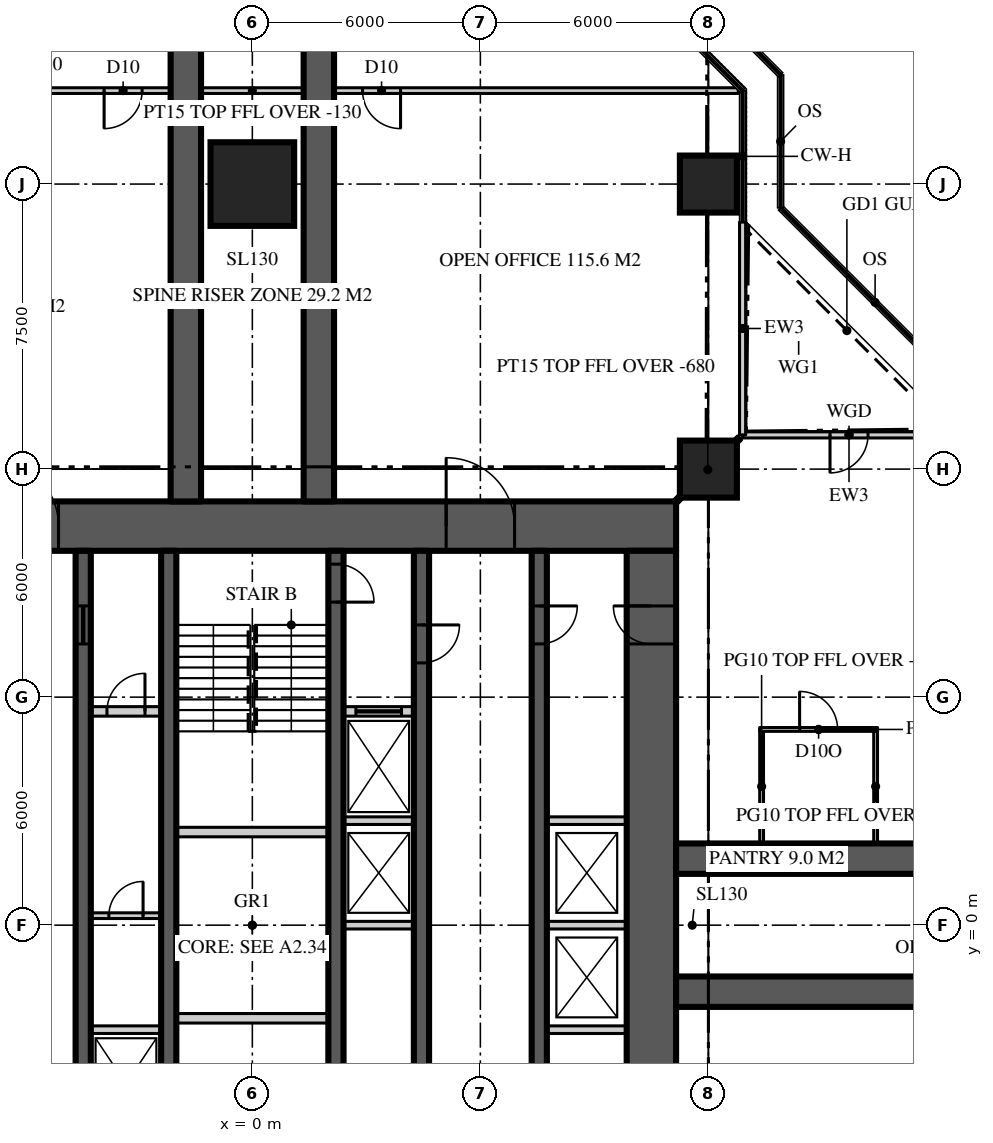
"""IFC4 building model, lengths in metres.
Left out: names, types, materials, properties, quantities, classifications, styles, units other than length and angle.
Written with IfcOpenShell. Run it as: python <this file> out.ifc"""

import sys

from ifc_helpers import new_model, si_unit, direction, frame, frame_2d, origin, origin_2d, place, context, subcontext, project, spatial, rectangle, extrude, element, fill, save


model = new_model("IFC4")
c1 = context("Model", 3, precision=1e-05, world=origin(), true_north=direction((0.0, 1.0)))
c2 = subcontext(c1, "Body", "Model", "MODEL_VIEW")
j1 = project(units=[si_unit("LENGTHUNIT", "METRE"), si_unit("PLANEANGLEUNIT", "RADIAN")], contexts=[c1])
p1 = place(None, origin())
s1 = spatial("IfcSite", under=j1, at=p1, CompositionType="ELEMENT")
p2 = place(p1, origin())
s2 = spatial("IfcBuilding", under=s1, at=p2, CompositionType="ELEMENT")
p3 = place(p2, frame((0.0, 0.0, 259.5)))
s3 = spatial("IfcBuildingStorey", under=s2, at=p3, CompositionType="ELEMENT", Elevation=259.5)
p4 = place(p3, frame((-11.15, 10.5, 0.0), z_axis=(0.0, 0.0, 1.0), x_axis=(1.0, 0.0, 0.0)))
e1 = element("IfcWall", 1, at=p4, inside=s3, PredefinedType="SHEAR", context=c2, shape_type="SweptSolid", body=[
    extrude(rectangle(XDim=22.3, YDim=1.3, at=frame_2d((11.15, 0.0))), origin(), (0.0, 0.0, 1.0), 3.9),
])
p5 = place(p4, frame((4.25, 0.0, 0.0)))
e2 = element("IfcOpeningElement", 2, at=p5, cuts=e1, PredefinedType="OPENING", context=c2, shape_type="SweptSolid", body=[
    extrude(rectangle(XDim=1.8, YDim=2.2, at=frame_2d((0.9, 1.1))), frame((0.0, 0.66, 0.0), z_axis=(0.0, -1.0, 0.0), x_axis=(1.0, 0.0, 0.0)), (0.0, 0.0, 1.0), 1.32),
])
p6 = place(p4, frame((16.25, 0.0, 0.0)))
e3 = element("IfcOpeningElement", 3, at=p6, cuts=e1, PredefinedType="OPENING", context=c2, shape_type="SweptSolid", body=[
    extrude(rectangle(XDim=1.8, YDim=2.2, at=frame_2d((0.9, 1.1))), frame((0.0, 0.66, 0.0), z_axis=(0.0, -1.0, 0.0), x_axis=(1.0, 0.0, 0.0)), (0.0, 0.0, 1.0), 1.32),
])
p7 = place(p3, frame((10.5, -9.85, 0.0), z_axis=(0.0, 0.0, 1.0), x_axis=(0.0, 1.0, 0.0)))
e4 = element("IfcWall", 4, at=p7, inside=s3, PredefinedType="SHEAR", context=c2, shape_type="SweptSolid", body=[
    extrude(rectangle(XDim=19.7, YDim=1.3, at=frame_2d((9.85, 0.0))), origin(), (0.0, 0.0, 1.0), 3.9),
])
p8 = place(p7, frame((17.25, 0.0, 0.0)))
e5 = element("IfcOpeningElement", 5, at=p8, cuts=e4, PredefinedType="OPENING", context=c2, shape_type="SweptSolid", body=[
    extrude(rectangle(XDim=1.0, YDim=2.2, at=frame_2d((0.5, 1.1))), frame((0.0, 0.66, 0.0), z_axis=(0.0, -1.0, 0.0), x_axis=(1.0, 0.0, 0.0)), (0.0, 0.0, 1.0), 1.32),
])
for number, where, z_axis, x_axis in (
    (6, (11.15, -1.75, 0.0), (0.0, 0.0, 1.0), (1.0, 0.0, 0.0)),
    (7, (11.15, 1.75, 0.0), (0.0, 0.0, 1.0), (1.0, 0.0, 0.0)),
    (8, (1.75, 11.15, 0.0), (0.0, 0.0, 1.0), (0.0, 1.0, 0.0)),
    (9, (-1.75, 11.15, 0.0), (0.0, 0.0, 1.0), (0.0, 1.0, 0.0)),
):
    element("IfcWall", number, at=place(p3, frame(where, z_axis=z_axis, x_axis=x_axis)), inside=s3, PredefinedType="SHEAR", context=c2, shape_type="SweptSolid", body=[
        extrude(rectangle(XDim=15.25, YDim=0.8, at=frame_2d((7.625, 0.0))), origin(), (0.0, 0.0, 1.0), 3.9),
    ])
p9 = place(p3, frame((12.0, 12.0, 0.0), z_axis=(0.0, 0.0, 1.0), x_axis=(1.0, 0.0, 0.0)))
e10 = element("IfcColumn", 10, at=p9, inside=s3, PredefinedType="COLUMN", context=c2, shape_type="SweptSolid", body=[
    extrude(rectangle(XDim=1.5, YDim=1.5, at=origin_2d()), origin(), (0.0, 0.0, 1.0), 3.9),
])
p10 = place(p3, frame((0.0, 19.5, 0.0), z_axis=(0.0, 0.0, 1.0), x_axis=(1.0, 0.0, 0.0)))
e11 = element("IfcColumn", 11, at=p10, inside=s3, PredefinedType="COLUMN", context=c2, shape_type="SweptSolid", body=[
    extrude(rectangle(XDim=2.2, YDim=2.2, at=origin_2d()), origin(), (0.0, 0.0, 1.0), 3.9),
])
p11 = place(p3, frame((12.0, 19.5, 0.0), z_axis=(0.0, 0.0, 1.0), x_axis=(1.0, 0.0, 0.0)))
e12 = element("IfcColumn", 12, at=p11, inside=s3, PredefinedType="COLUMN", context=c2, shape_type="SweptSolid", body=[
    extrude(rectangle(XDim=1.5, YDim=1.5, at=origin_2d()), origin(), (0.0, 0.0, 1.0), 3.9),
])
p12 = place(p3, frame((18.5, 12.9, 0.0), z_axis=(0.0, 0.0, 1.0), x_axis=(-1.0, 0.0, 0.0)))
e13 = element("IfcWall", 13, at=p12, inside=s3, PredefinedType="SOLIDWALL", context=c2, shape_type="SweptSolid", body=[
    extrude(rectangle(XDim=5.6, YDim=0.16, at=frame_2d((2.8, 0.0))), origin(), (0.0, 0.0, 1.0), 3.77),
])
p13 = place(p12, frame((2.3, 0.0, 0.0)))
e14 = element("IfcOpeningElement", 14, at=p13, cuts=e13, PredefinedType="OPENING", context=c2, shape_type="SweptSolid", body=[
    extrude(rectangle(XDim=1.0, YDim=2.2, at=frame_2d((0.5, 1.1))), frame((0.0, 0.09, 0.0), z_axis=(0.0, -1.0, 0.0), x_axis=(1.0, 0.0, 0.0)), (0.0, 0.0, 1.0), 0.18),
])
p14 = place(p3, frame((12.9, 12.9, 0.0), z_axis=(0.0, 0.0, 1.0), x_axis=(0.0, 1.0, 0.0)))
e15 = element("IfcWall", 15, at=p14, inside=s3, PredefinedType="SOLIDWALL", context=c2, shape_type="SweptSolid", body=[
    extrude(rectangle(XDim=5.6, YDim=0.16, at=frame_2d((2.8, 0.0))), origin(), (0.0, 0.0, 1.0), 3.77),
])
p15 = place(p3, frame((7.55, 9.85, 0.0), z_axis=(0.0, 0.0, 1.0), x_axis=(0.0, -1.0, 0.0)))
e16 = element("IfcWall", 16, at=p15, inside=s3, PredefinedType="SHEAR", context=c2, shape_type="SweptSolid", body=[
    extrude(rectangle(XDim=19.7, YDim=0.4, at=frame_2d((9.85, 0.0))), origin(), (0.0, 0.0, 1.0), 3.9),
])
p16 = place(p15, frame((1.45, 0.0, 0.0)))
e17 = element("IfcOpeningElement", 17, at=p16, cuts=e16, PredefinedType="OPENING", context=c2, shape_type="SweptSolid", body=[
    extrude(rectangle(XDim=1.0, YDim=2.2, at=frame_2d((0.5, 1.1))), frame((0.0, 0.21, 0.0), z_axis=(0.0, -1.0, 0.0), x_axis=(1.0, 0.0, 0.0)), (0.0, 0.0, 1.0), 0.42),
])
p17 = place(p15, frame((17.3, 0.0, 0.0)))
e18 = element("IfcOpeningElement", 18, at=p17, cuts=e16, PredefinedType="OPENING", context=c2, shape_type="SweptSolid", body=[
    extrude(rectangle(XDim=0.9, YDim=2.1, at=frame_2d((0.45, 1.05))), frame((0.0, 0.21, 0.0), z_axis=(0.0, -1.0, 0.0), x_axis=(1.0, 0.0, 0.0)), (0.0, 0.0, 1.0), 0.42),
])
p18 = place(p3, frame((-4.45, -9.85, 0.0), z_axis=(0.0, 0.0, 1.0), x_axis=(0.0, 1.0, 0.0)))
e19 = element("IfcWall", 19, at=p18, inside=s3, PredefinedType="SHEAR", context=c2, shape_type="SweptSolid", body=[
    extrude(rectangle(XDim=19.7, YDim=0.4, at=frame_2d((9.85, 0.0))), origin(), (0.0, 0.0, 1.0), 3.9),
])
p19 = place(p18, frame((1.95, 0.0, 0.0)))
e20 = element("IfcOpeningElement", 20, at=p19, cuts=e19, PredefinedType="OPENING", context=c2, shape_type="SweptSolid", body=[
    extrude(rectangle(XDim=1.0, YDim=2.2, at=frame_2d((0.5, 1.1))), frame((0.0, 0.21, 0.0), z_axis=(0.0, -1.0, 0.0), x_axis=(1.0, 0.0, 0.0)), (0.0, 0.0, 1.0), 0.42),
])
p20 = place(p18, frame((17.25, 0.0, 0.0)))
e21 = element("IfcOpeningElement", 21, at=p20, cuts=e19, PredefinedType="OPENING", context=c2, shape_type="SweptSolid", body=[
    extrude(rectangle(XDim=1.0, YDim=2.1, at=frame_2d((0.5, 1.05))), frame((0.0, 0.21, 0.0), z_axis=(0.0, -1.0, 0.0), x_axis=(1.0, 0.0, 0.0)), (0.0, 0.0, 1.0), 0.42),
])
p21 = place(p3, frame((4.45, 9.85, 0.0), z_axis=(0.0, 0.0, 1.0), x_axis=(0.0, -1.0, 0.0)))
e22 = element("IfcWall", 22, at=p21, inside=s3, PredefinedType="SHEAR", context=c2, shape_type="SweptSolid", body=[
    extrude(rectangle(XDim=19.7, YDim=0.4, at=frame_2d((9.85, 0.0))), origin(), (0.0, 0.0, 1.0), 3.9),
])
p22 = place(p21, frame((1.95, 0.0, 0.0)))
e23 = element("IfcOpeningElement", 23, at=p22, cuts=e22, PredefinedType="OPENING", context=c2, shape_type="SweptSolid", body=[
    extrude(rectangle(XDim=1.0, YDim=2.2, at=frame_2d((0.5, 1.1))), frame((0.0, 0.21, 0.0), z_axis=(0.0, -1.0, 0.0), x_axis=(1.0, 0.0, 0.0)), (0.0, 0.0, 1.0), 0.42),
])
p23 = place(p21, frame((17.3, 0.0, 0.0)))
e24 = element("IfcOpeningElement", 24, at=p23, cuts=e22, PredefinedType="OPENING", context=c2, shape_type="SweptSolid", body=[
    extrude(rectangle(XDim=0.9, YDim=2.1, at=frame_2d((0.45, 1.05))), frame((0.0, 0.21, 0.0), z_axis=(0.0, -1.0, 0.0), x_axis=(1.0, 0.0, 0.0)), (0.0, 0.0, 1.0), 0.42),
])
p24 = place(p3, frame((-2.2, -9.85, 0.0), z_axis=(0.0, 0.0, 1.0), x_axis=(0.0, 1.0, 0.0)))
e25 = element("IfcWall", 25, at=p24, inside=s3, PredefinedType="SHEAR", context=c2, shape_type="SweptSolid", body=[
    extrude(rectangle(XDim=19.7, YDim=0.4, at=frame_2d((9.85, 0.0))), origin(), (0.0, 0.0, 1.0), 3.9),
])
p25 = place(p24, frame((0.35, 0.0, 0.0)))
e26 = element("IfcOpeningElement", 26, at=p25, cuts=e25, PredefinedType="OPENING", context=c2, shape_type="SweptSolid", body=[
    extrude(rectangle(XDim=1.0, YDim=2.2, at=frame_2d((0.5, 1.1))), frame((0.0, 0.21, 0.0), z_axis=(0.0, -1.0, 0.0), x_axis=(1.0, 0.0, 0.0)), (0.0, 0.0, 1.0), 0.42),
])
p26 = place(p3, frame((2.2, 9.85, 0.0), z_axis=(0.0, 0.0, 1.0), x_axis=(0.0, -1.0, 0.0)))
e27 = element("IfcWall", 27, at=p26, inside=s3, PredefinedType="SHEAR", context=c2, shape_type="SweptSolid", body=[
    extrude(rectangle(XDim=19.7, YDim=0.4, at=frame_2d((9.85, 0.0))), origin(), (0.0, 0.0, 1.0), 3.9),
])
p27 = place(p26, frame((0.35, 0.0, 0.0)))
e28 = element("IfcOpeningElement", 28, at=p27, cuts=e27, PredefinedType="OPENING", context=c2, shape_type="SweptSolid", body=[
    extrude(rectangle(XDim=1.0, YDim=2.2, at=frame_2d((0.5, 1.1))), frame((0.0, 0.21, 0.0), z_axis=(0.0, -1.0, 0.0), x_axis=(1.0, 0.0, 0.0)), (0.0, 0.0, 1.0), 0.42),
])
p28 = place(p3, frame((-4.25, 5.625, 0.0), z_axis=(0.0, 0.0, 1.0), x_axis=(1.0, 0.0, 0.0)))
e29 = element("IfcWall", 29, at=p28, inside=s3, PredefinedType="SOLIDWALL", context=c2, shape_type="SweptSolid", body=[
    extrude(rectangle(XDim=1.85, YDim=0.25, at=frame_2d((0.925, 0.0))), origin(), (0.0, 0.0, 1.0), 3.7),
])
p29 = place(p28, frame((0.425, 0.0, 0.0)))
e30 = element("IfcOpeningElement", 30, at=p29, cuts=e29, PredefinedType="OPENING", context=c2, shape_type="SweptSolid", body=[
    extrude(rectangle(XDim=1.0, YDim=2.2, at=frame_2d((0.5, 1.1))), frame((0.0, 0.135, 0.0), z_axis=(0.0, -1.0, 0.0), x_axis=(1.0, 0.0, 0.0)), (0.0, 0.0, 1.0), 0.27),
])
p30 = place(p3, frame((2.4, 5.625, 0.0), z_axis=(0.0, 0.0, 1.0), x_axis=(1.0, 0.0, 0.0)))
e31 = element("IfcWall", 31, at=p30, inside=s3, PredefinedType="SOLIDWALL", context=c2, shape_type="SweptSolid", body=[
    extrude(rectangle(XDim=1.85, YDim=0.25, at=frame_2d((0.925, 0.0))), origin(), (0.0, 0.0, 1.0), 3.7),
])
p31 = place(p30, frame((0.325, 0.0, 0.0)))
e32 = element("IfcOpeningElement", 32, at=p31, cuts=e31, PredefinedType="OPENING", context=c2, shape_type="SweptSolid", body=[
    extrude(rectangle(XDim=1.2, YDim=2.2, at=frame_2d((0.6, 1.1))), frame((0.0, 0.135, 0.0), z_axis=(0.0, -1.0, 0.0), x_axis=(1.0, 0.0, 0.0)), (0.0, 0.0, 1.0), 0.27),
])
for number, where, z_axis, x_axis in (
    (33, (-2.0, -2.45, 0.0), (0.0, 0.0, 1.0), (1.0, 0.0, 0.0)),
    (34, (-2.0, 2.45, 0.0), (0.0, 0.0, 1.0), (1.0, 0.0, 0.0)),
):
    element("IfcWall", number, at=place(p3, frame(where, z_axis=z_axis, x_axis=x_axis)), inside=s3, PredefinedType="SOLIDWALL", context=c2, shape_type="SweptSolid", body=[
        extrude(rectangle(XDim=4.0, YDim=0.25, at=frame_2d((2.0, 0.0))), origin(), (0.0, 0.0, 1.0), 3.7),
    ])
p32 = place(p3, frame((-4.25, -2.75, 0.0), z_axis=(0.0, 0.0, 1.0), x_axis=(1.0, 0.0, 0.0)))
e35 = element("IfcWall", 35, at=p32, inside=s3, PredefinedType="SOLIDWALL", context=c2, shape_type="SweptSolid", body=[
    extrude(rectangle(XDim=1.85, YDim=0.2, at=frame_2d((0.925, 0.0))), origin(), (0.0, 0.0, 1.0), 3.7),
])
p33 = place(p3, frame((7.75, -2.75, 0.0), z_axis=(0.0, 0.0, 1.0), x_axis=(1.0, 0.0, 0.0)))
e36 = element("IfcWall", 36, at=p33, inside=s3, PredefinedType="SOLIDWALL", context=c2, shape_type="SweptSolid", body=[
    extrude(rectangle(XDim=2.1, YDim=0.2, at=frame_2d((1.05, 0.0))), origin(), (0.0, 0.0, 1.0), 3.7),
])
p34 = place(p3, frame((2.4, 0.0, 0.0), z_axis=(0.0, 0.0, 1.0), x_axis=(1.0, 0.0, 0.0)))
e37 = element("IfcWall", 37, at=p34, inside=s3, PredefinedType="SOLIDWALL", context=c2, shape_type="SweptSolid", body=[
    extrude(rectangle(XDim=1.85, YDim=0.2, at=frame_2d((0.925, 0.0))), origin(), (0.0, 0.0, 1.0), 3.7),
])
p35 = place(p3, frame((7.75, 0.0, 0.0), z_axis=(0.0, 0.0, 1.0), x_axis=(1.0, 0.0, 0.0)))
e38 = element("IfcWall", 38, at=p35, inside=s3, PredefinedType="SOLIDWALL", context=c2, shape_type="SweptSolid", body=[
    extrude(rectangle(XDim=2.1, YDim=0.2, at=frame_2d((1.05, 0.0))), origin(), (0.0, 0.0, 1.0), 3.7),
])
p36 = place(p3, frame((2.4, 2.75, 0.0), z_axis=(0.0, 0.0, 1.0), x_axis=(1.0, 0.0, 0.0)))
e39 = element("IfcWall", 39, at=p36, inside=s3, PredefinedType="SOLIDWALL", context=c2, shape_type="SweptSolid", body=[
    extrude(rectangle(XDim=1.85, YDim=0.2, at=frame_2d((0.925, 0.0))), origin(), (0.0, 0.0, 1.0), 3.7),
])
p37 = place(p3, frame((7.75, 2.75, 0.0), z_axis=(0.0, 0.0, 1.0), x_axis=(1.0, 0.0, 0.0)))
e40 = element("IfcWall", 40, at=p37, inside=s3, PredefinedType="SOLIDWALL", context=c2, shape_type="SweptSolid", body=[
    extrude(rectangle(XDim=2.1, YDim=0.2, at=frame_2d((1.05, 0.0))), origin(), (0.0, 0.0, 1.0), 3.7),
])
for number, where, z_axis, x_axis in (
    (41, (13.4, 2.15, 0.0), (0.0, 0.0, 1.0), (0.0, 1.0, 0.0)),
    (42, (16.4, 2.15, 0.0), (0.0, 0.0, 1.0), (0.0, 1.0, 0.0)),
):
    element("IfcWall", number, at=place(p3, frame(where, z_axis=z_axis, x_axis=x_axis)), inside=s3, PredefinedType="PARTITIONING", context=c2, shape_type="SweptSolid", body=[
        extrude(rectangle(XDim=3.0, YDim=0.1, at=frame_2d((1.5, 0.0))), origin(), (0.0, 0.0, 1.0), 3.77),
    ])
p38 = place(p3, frame((13.35, 5.15, 0.0), z_axis=(0.0, 0.0, 1.0), x_axis=(1.0, 0.0, 0.0)))
e43 = element("IfcWall", 43, at=p38, inside=s3, PredefinedType="PARTITIONING", context=c2, shape_type="SweptSolid", body=[
    extrude(rectangle(XDim=3.1, YDim=0.1, at=frame_2d((1.55, 0.0))), origin(), (0.0, 0.0, 1.0), 3.77),
])
p39 = place(p38, frame((1.05, 0.0, 0.0)))
e44 = element("IfcOpeningElement", 44, at=p39, cuts=e43, PredefinedType="OPENING", context=c2, shape_type="SweptSolid", body=[
    extrude(rectangle(XDim=1.0, YDim=2.2, at=frame_2d((0.5, 1.1))), frame((0.0, 0.06, 0.0), z_axis=(0.0, -1.0, 0.0), x_axis=(1.0, 0.0, 0.0)), (0.0, 0.0, 1.0), 0.12),
])
p40 = place(p3, frame((12.786, 21.959, 0.0), z_axis=(0.0, 0.0, 1.0), x_axis=(-1.0, 0.0, 0.0)))
e45 = element("IfcWall", 45, at=p40, inside=s3, PredefinedType="PARTITIONING", context=c2, shape_type="SweptSolid", body=[
    extrude(rectangle(XDim=25.573, YDim=0.15, at=frame_2d((12.786, 0.0))), origin(), (0.0, 0.0, 1.0), 3.77),
])
p41 = place(p40, frame((15.687, 0.0, 0.0)))
e46 = element("IfcOpeningElement", 46, at=p41, cuts=e45, PredefinedType="OPENING", context=c2, shape_type="SweptSolid", body=[
    extrude(rectangle(XDim=1.0, YDim=2.2, at=frame_2d((0.5, 1.1))), frame((0.0, 0.085, 0.0), z_axis=(0.0, -1.0, 0.0), x_axis=(1.0, 0.0, 0.0)), (0.0, 0.0, 1.0), 0.17),
])
p42 = place(p40, frame((8.886, 0.0, 0.0)))
e47 = element("IfcOpeningElement", 47, at=p42, cuts=e45, PredefinedType="OPENING", context=c2, shape_type="SweptSolid", body=[
    extrude(rectangle(XDim=1.0, YDim=2.2, at=frame_2d((0.5, 1.1))), frame((0.0, 0.085, 0.0), z_axis=(0.0, -1.0, 0.0), x_axis=(1.0, 0.0, 0.0)), (0.0, 0.0, 1.0), 0.17),
])
p43 = place(p3, frame((11.15, 11.15, 0.0), z_axis=(0.0, 0.0, 1.0), x_axis=(0.707106781187, 0.707106781187, 0.0)))
e48 = element("IfcWall", 48, at=p43, inside=s3, PredefinedType="PARTITIONING", context=c2, shape_type="SweptSolid", body=[
    extrude(rectangle(XDim=2.362, YDim=0.15, at=frame_2d((1.181, 0.0))), origin(), (0.0, 0.0, 1.0), 3.22),
])
p44 = place(p3, frame((-4.25, 0.25, 0.0), z_axis=(0.0, 0.0, 1.0), x_axis=(1.0, 0.0, 0.0)))
e49 = element("IfcWall", 49, at=p44, inside=s3, PredefinedType="SOLIDWALL", context=c2, shape_type="SweptSolid", body=[
    extrude(rectangle(XDim=1.85, YDim=0.15, at=frame_2d((0.925, 0.0))), origin(), (0.0, 0.0, 1.0), 3.77),
])
p45 = place(p44, frame((0.475, 0.0, 0.0)))
e50 = element("IfcOpeningElement", 50, at=p45, cuts=e49, PredefinedType="OPENING", context=c2, shape_type="SweptSolid", body=[
    extrude(rectangle(XDim=0.9, YDim=2.1, at=frame_2d((0.45, 1.05))), frame((0.0, 0.085, 0.0), z_axis=(0.0, -1.0, 0.0), x_axis=(1.0, 0.0, 0.0)), (0.0, 0.0, 1.0), 0.17),
])
p46 = place(p13, origin())
e51 = element("IfcDoor", 51, at=p46, inside=s3, OperationType="SINGLE_SWING_RIGHT", PredefinedType="DOOR", context=c2, shape_type="SweptSolid", body=[
    extrude(rectangle(XDim=1.0, YDim=2.2, at=frame_2d((0.5, 1.1))), frame((0.0, 0.025, 0.0), z_axis=(0.0, -1.0, 0.0), x_axis=(1.0, 0.0, 0.0)), (0.0, 0.0, 1.0), 0.05),
])
fill(e14, e51)
p47 = place(p5, origin())
e52 = element("IfcDoor", 52, at=p47, inside=s3, OperationType="DOUBLE_DOOR_DOUBLE_SWING", PredefinedType="DOOR", context=c2, shape_type="SweptSolid", body=[
    extrude(rectangle(XDim=1.8, YDim=2.2, at=frame_2d((0.9, 1.1))), frame((0.0, 0.025, 0.0), z_axis=(0.0, -1.0, 0.0), x_axis=(1.0, 0.0, 0.0)), (0.0, 0.0, 1.0), 0.05),
])
fill(e2, e52)
p48 = place(p6, origin())
e53 = element("IfcDoor", 53, at=p48, inside=s3, OperationType="DOUBLE_DOOR_DOUBLE_SWING", PredefinedType="DOOR", context=c2, shape_type="SweptSolid", body=[
    extrude(rectangle(XDim=1.8, YDim=2.2, at=frame_2d((0.9, 1.1))), frame((0.0, 0.025, 0.0), z_axis=(0.0, -1.0, 0.0), x_axis=(1.0, 0.0, 0.0)), (0.0, 0.0, 1.0), 0.05),
])
fill(e3, e53)
p49 = place(p16, origin())
e54 = element("IfcDoor", 54, at=p49, inside=s3, OperationType="SINGLE_SWING_LEFT", PredefinedType="DOOR", context=c2, shape_type="SweptSolid", body=[
    extrude(rectangle(XDim=1.0, YDim=2.2, at=frame_2d((0.5, 1.1))), frame((0.0, 0.025, 0.0), z_axis=(0.0, -1.0, 0.0), x_axis=(1.0, 0.0, 0.0)), (0.0, 0.0, 1.0), 0.05),
])
fill(e17, e54)
p50 = place(p8, origin())
e55 = element("IfcDoor", 55, at=p50, inside=s3, OperationType="SINGLE_SWING_RIGHT", PredefinedType="DOOR", context=c2, shape_type="SweptSolid", body=[
    extrude(rectangle(XDim=1.0, YDim=2.2, at=frame_2d((0.5, 1.1))), frame((0.0, 0.025, 0.0), z_axis=(0.0, -1.0, 0.0), x_axis=(1.0, 0.0, 0.0)), (0.0, 0.0, 1.0), 0.05),
])
fill(e5, e55)
p51 = place(p22, origin())
e56 = element("IfcDoor", 56, at=p51, inside=s3, OperationType="SINGLE_SWING_LEFT", PredefinedType="DOOR", context=c2, shape_type="SweptSolid", body=[
    extrude(rectangle(XDim=1.0, YDim=2.2, at=frame_2d((0.5, 1.1))), frame((0.0, 0.025, 0.0), z_axis=(0.0, -1.0, 0.0), x_axis=(1.0, 0.0, 0.0)), (0.0, 0.0, 1.0), 0.05),
])
fill(e23, e56)
p52 = place(p27, origin())
e57 = element("IfcDoor", 57, at=p52, inside=s3, OperationType="SINGLE_SWING_RIGHT", PredefinedType="DOOR", context=c2, shape_type="SweptSolid", body=[
    extrude(rectangle(XDim=1.0, YDim=2.2, at=frame_2d((0.5, 1.1))), frame((0.0, 0.025, 0.0), z_axis=(0.0, -1.0, 0.0), x_axis=(1.0, 0.0, 0.0)), (0.0, 0.0, 1.0), 0.05),
])
fill(e28, e57)
p53 = place(p20, origin())
e58 = element("IfcDoor", 58, at=p53, inside=s3, OperationType="SLIDING_TO_LEFT", PredefinedType="DOOR", context=c2, shape_type="SweptSolid", body=[
    extrude(rectangle(XDim=1.0, YDim=2.1, at=frame_2d((0.5, 1.05))), frame((0.0, 0.025, 0.0), z_axis=(0.0, -1.0, 0.0), x_axis=(1.0, 0.0, 0.0)), (0.0, 0.0, 1.0), 0.05),
])
fill(e21, e58)
p54 = place(p31, origin())
e59 = element("IfcDoor", 59, at=p54, inside=s3, OperationType="SLIDING_TO_LEFT", PredefinedType="DOOR", context=c2, shape_type="SweptSolid", body=[
    extrude(rectangle(XDim=1.2, YDim=2.2, at=frame_2d((0.6, 1.1))), frame((0.0, 0.025, 0.0), z_axis=(0.0, -1.0, 0.0), x_axis=(1.0, 0.0, 0.0)), (0.0, 0.0, 1.0), 0.05),
])
fill(e32, e59)
p55 = place(p39, origin())
e60 = element("IfcDoor", 60, at=p55, inside=s3, OperationType="SINGLE_SWING_LEFT", PredefinedType="DOOR", context=c2, shape_type="SweptSolid", body=[
    extrude(rectangle(XDim=1.0, YDim=2.2, at=frame_2d((0.5, 1.1))), frame((0.0, 0.025, 0.0), z_axis=(0.0, -1.0, 0.0), x_axis=(1.0, 0.0, 0.0)), (0.0, 0.0, 1.0), 0.05),
])
fill(e44, e60)
p56 = place(p41, origin())
e61 = element("IfcDoor", 61, at=p56, inside=s3, OperationType="SINGLE_SWING_RIGHT", PredefinedType="DOOR", context=c2, shape_type="SweptSolid", body=[
    extrude(rectangle(XDim=1.0, YDim=2.2, at=frame_2d((0.5, 1.1))), frame((0.0, 0.025, 0.0), z_axis=(0.0, -1.0, 0.0), x_axis=(1.0, 0.0, 0.0)), (0.0, 0.0, 1.0), 0.05),
])
fill(e46, e61)
p57 = place(p42, origin())
e62 = element("IfcDoor", 62, at=p57, inside=s3, OperationType="SINGLE_SWING_LEFT", PredefinedType="DOOR", context=c2, shape_type="SweptSolid", body=[
    extrude(rectangle(XDim=1.0, YDim=2.2, at=frame_2d((0.5, 1.1))), frame((0.0, 0.025, 0.0), z_axis=(0.0, -1.0, 0.0), x_axis=(1.0, 0.0, 0.0)), (0.0, 0.0, 1.0), 0.05),
])
fill(e47, e62)
p58 = place(p45, origin())
e63 = element("IfcDoor", 63, at=p58, inside=s3, OperationType="SINGLE_SWING_RIGHT", PredefinedType="DOOR", context=c2, shape_type="SweptSolid", body=[
    extrude(rectangle(XDim=0.9, YDim=2.1, at=frame_2d((0.45, 1.05))), frame((0.0, 0.025, 0.0), z_axis=(0.0, -1.0, 0.0), x_axis=(1.0, 0.0, 0.0)), (0.0, 0.0, 1.0), 0.05),
])
fill(e50, e63)
p59 = place(p29, origin())
e64 = element("IfcDoor", 64, at=p59, inside=s3, OperationType="SINGLE_SWING_RIGHT", PredefinedType="DOOR", context=c2, shape_type="SweptSolid", body=[
    extrude(rectangle(XDim=1.0, YDim=2.2, at=frame_2d((0.5, 1.1))), frame((0.0, 0.025, 0.0), z_axis=(0.0, -1.0, 0.0), x_axis=(1.0, 0.0, 0.0)), (0.0, 0.0, 1.0), 0.05),
])
fill(e30, e64)
save(model, sys.argv[1])
